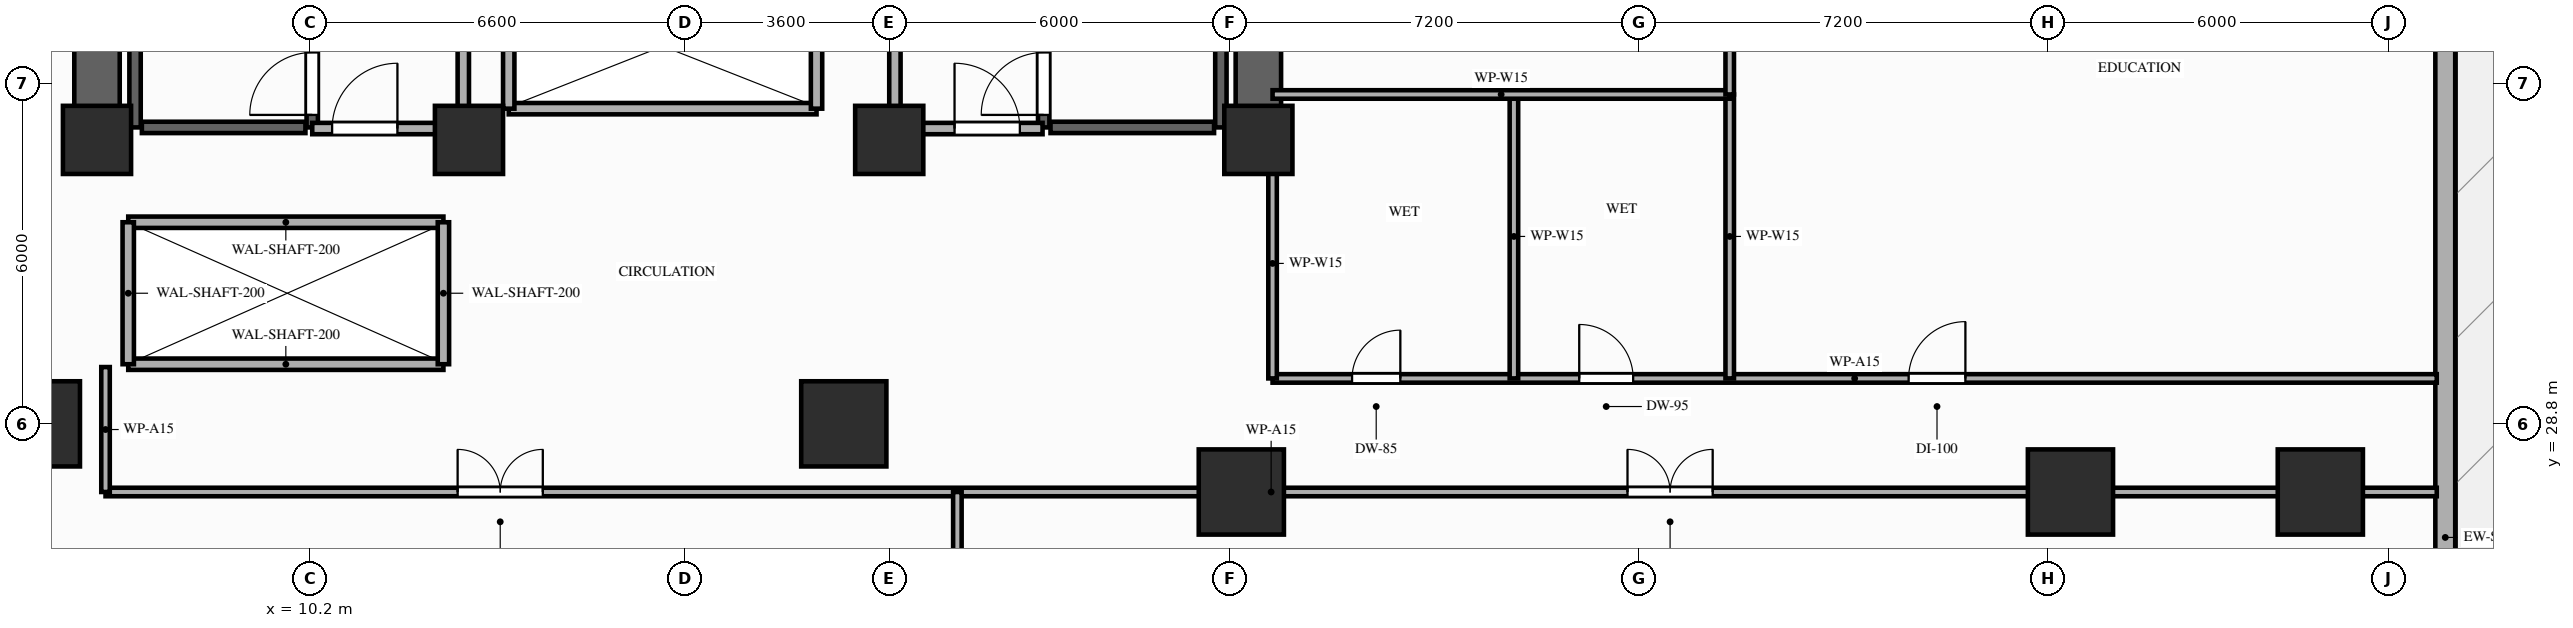
"""IFC4 building model, lengths in metres.
Left out: names, types, materials, properties, quantities, classifications, styles, units other than length and angle.
Written with IfcOpenShell. Run it as: python <this file> out.ifc"""

import sys

from ifc_helpers import new_model, si_unit, direction, frame, frame_2d, origin, origin_2d, place, context, subcontext, project, spatial, rectangle, extrude, element, fill, save


model = new_model("IFC4")
c1 = context("Model", 3, precision=1e-05, world=origin(), true_north=direction((0.0, 1.0)))
c2 = subcontext(c1, "Body", "Model", "MODEL_VIEW")
j1 = project(units=[si_unit("LENGTHUNIT", "METRE"), si_unit("PLANEANGLEUNIT", "RADIAN")], contexts=[c1])
p1 = place(None, origin())
s1 = spatial("IfcSite", under=j1, at=p1, CompositionType="ELEMENT")
p2 = place(p1, origin())
s2 = spatial("IfcBuilding", under=s1, at=p2, CompositionType="ELEMENT")
p3 = place(p2, frame((0.0, 0.0, 21.8)))
s3 = spatial("IfcBuildingStorey", under=s2, at=p3, CompositionType="ELEMENT", Elevation=21.8)
for number, where, z_axis, x_axis in (
    (1, (6.45, 33.8, 0.0), (0.0, 0.0, 1.0), (1.0, 0.0, 0.0)),
    (2, (13.0, 33.8, 0.0), (0.0, 0.0, 1.0), (1.0, 0.0, 0.0)),
    (3, (20.4, 33.8, 0.0), (0.0, 0.0, 1.0), (1.0, 0.0, 0.0)),
    (4, (26.9, 33.8, 0.0), (0.0, 0.0, 1.0), (1.0, 0.0, 0.0)),
):
    element("IfcColumn", number, at=place(p3, frame(where, z_axis=z_axis, x_axis=x_axis)), inside=s3, PredefinedType="COLUMN", context=c2, shape_type="SweptSolid", body=[
        extrude(rectangle(XDim=1.2, YDim=1.2, at=origin_2d()), origin(), (0.0, 0.0, 1.0), 4.6),
    ])
for number, where, z_axis, x_axis in (
    (5, (5.4, 28.8, 0.0), (0.0, 0.0, 1.0), (1.0, 0.0, 0.0)),
    (6, (19.6, 28.8, 0.0), (0.0, 0.0, 1.0), (1.0, 0.0, 0.0)),
    (7, (26.6, 27.6, 0.0), (0.0, 0.0, 1.0), (1.0, 0.0, 0.0)),
    (8, (41.2, 27.6, 0.0), (0.0, 0.0, 1.0), (1.0, 0.0, 0.0)),
):
    element("IfcColumn", number, at=place(p3, frame(where, z_axis=z_axis, x_axis=x_axis)), inside=s3, PredefinedType="COLUMN", context=c2, shape_type="SweptSolid", body=[
        extrude(rectangle(XDim=1.5, YDim=1.5, at=origin_2d()), origin(), (0.0, 0.0, 1.0), 4.05),
    ])
p4 = place(p3, frame((45.6, 27.6, 0.0), z_axis=(0.0, 0.0, 1.0), x_axis=(1.0, 0.0, 0.0)))
e9 = element("IfcColumn", 9, at=p4, inside=s3, PredefinedType="COLUMN", context=c2, shape_type="SweptSolid", body=[
    extrude(rectangle(XDim=1.5, YDim=1.5, at=origin_2d()), origin(), (0.0, 0.0, 1.0), 4.6),
])
p5 = place(p3, frame((47.8, 8.65, 0.0), z_axis=(0.0, 0.0, 1.0), x_axis=(0.0, 1.0, 0.0)))
e10 = element("IfcWall", 10, at=p5, inside=s3, PredefinedType="STANDARD", context=c2, shape_type="SweptSolid", body=[
    extrude(rectangle(XDim=36.3, YDim=0.35, at=frame_2d((18.15, 0.0))), origin(), (0.0, 0.0, 1.0), 4.36),
])
p6 = place(p5, frame((3.4, 0.0, 0.0)))
e11 = element("IfcOpeningElement", 11, at=p6, cuts=e10, PredefinedType="OPENING", context=c2, shape_type="SweptSolid", body=[
    extrude(rectangle(XDim=1.6, YDim=2.15, at=frame_2d((0.8, 1.075))), frame((0.0, 0.185, 0.0), z_axis=(0.0, -1.0, 0.0), x_axis=(1.0, 0.0, 0.0)), (0.0, 0.0, 1.0), 0.37),
])
for number, where, z_axis, x_axis in (
    (12, (6.45, 33.8, 0.0), (0.0, 0.0, 1.0), (0.0, 1.0, 0.0)),
    (13, (26.9, 33.8, 0.0), (0.0, 0.0, 1.0), (0.0, 1.0, 0.0)),
):
    element("IfcWall", number, at=place(p3, frame(where, z_axis=z_axis, x_axis=x_axis)), inside=s3, PredefinedType="SHEAR", context=c2, shape_type="SweptSolid", body=[
        extrude(rectangle(XDim=7.95, YDim=0.8, at=frame_2d((3.975, 0.0))), origin(), (0.0, 0.0, 1.0), 4.36),
    ])
p7 = place(p3, frame((7.12, 34.02, 0.0), z_axis=(0.0, 0.0, 1.0), x_axis=(0.0, 1.0, 0.0)))
e14 = element("IfcWall", 14, at=p7, inside=s3, PredefinedType="SHEAR", context=c2, shape_type="SweptSolid", body=[
    extrude(rectangle(XDim=7.78, YDim=0.2, at=frame_2d((3.89, 0.0))), origin(), (0.0, 0.0, 1.0), 4.36),
])
p8 = place(p3, frame((10.24, 34.02, 0.0), z_axis=(0.0, 0.0, 1.0), x_axis=(0.0, 1.0, 0.0)))
e15 = element("IfcWall", 15, at=p8, inside=s3, PredefinedType="SHEAR", context=c2, shape_type="SweptSolid", body=[
    extrude(rectangle(XDim=7.78, YDim=0.2, at=frame_2d((3.89, 0.0))), origin(), (0.0, 0.0, 1.0), 4.36),
])
p9 = place(p8, frame((0.22, 0.0, 0.0)))
e16 = element("IfcOpeningElement", 16, at=p9, cuts=e15, PredefinedType="OPENING", context=c2, shape_type="SweptSolid", body=[
    extrude(rectangle(XDim=1.1, YDim=2.15, at=frame_2d((0.55, 1.075))), frame((0.0, 0.11, 0.0), z_axis=(0.0, -1.0, 0.0), x_axis=(1.0, 0.0, 0.0)), (0.0, 0.0, 1.0), 0.22),
])
p10 = place(p3, frame((7.24, 34.02, 0.0), z_axis=(0.0, 0.0, 1.0), x_axis=(1.0, 0.0, 0.0)))
e17 = element("IfcWall", 17, at=p10, inside=s3, PredefinedType="SHEAR", context=c2, shape_type="SweptSolid", body=[
    extrude(rectangle(XDim=2.88, YDim=0.2, at=frame_2d((1.44, 0.0))), origin(), (0.0, 0.0, 1.0), 4.36),
])
p11 = place(p3, frame((23.12, 34.02, 0.0), z_axis=(0.0, 0.0, 1.0), x_axis=(0.0, 1.0, 0.0)))
e18 = element("IfcWall", 18, at=p11, inside=s3, PredefinedType="SHEAR", context=c2, shape_type="SweptSolid", body=[
    extrude(rectangle(XDim=7.78, YDim=0.2, at=frame_2d((3.89, 0.0))), origin(), (0.0, 0.0, 1.0), 4.36),
])
p12 = place(p11, frame((0.22, 0.0, 0.0)))
e19 = element("IfcOpeningElement", 19, at=p12, cuts=e18, PredefinedType="OPENING", context=c2, shape_type="SweptSolid", body=[
    extrude(rectangle(XDim=1.1, YDim=2.15, at=frame_2d((0.55, 1.075))), frame((0.0, 0.11, 0.0), z_axis=(0.0, -1.0, 0.0), x_axis=(1.0, 0.0, 0.0)), (0.0, 0.0, 1.0), 0.22),
])
p13 = place(p3, frame((26.24, 34.02, 0.0), z_axis=(0.0, 0.0, 1.0), x_axis=(0.0, 1.0, 0.0)))
e20 = element("IfcWall", 20, at=p13, inside=s3, PredefinedType="SHEAR", context=c2, shape_type="SweptSolid", body=[
    extrude(rectangle(XDim=7.78, YDim=0.2, at=frame_2d((3.89, 0.0))), origin(), (0.0, 0.0, 1.0), 4.36),
])
p14 = place(p3, frame((23.24, 34.02, 0.0), z_axis=(0.0, 0.0, 1.0), x_axis=(1.0, 0.0, 0.0)))
e21 = element("IfcWall", 21, at=p14, inside=s3, PredefinedType="SHEAR", context=c2, shape_type="SweptSolid", body=[
    extrude(rectangle(XDim=2.88, YDim=0.2, at=frame_2d((1.44, 0.0))), origin(), (0.0, 0.0, 1.0), 4.36),
])
for number, where, z_axis, x_axis in (
    (22, (7.0, 29.85, 0.0), (0.0, 0.0, 1.0), (1.0, 0.0, 0.0)),
    (23, (7.0, 32.35, 0.0), (0.0, 0.0, 1.0), (1.0, 0.0, 0.0)),
):
    element("IfcWall", number, at=place(p3, frame(where, z_axis=z_axis, x_axis=x_axis)), inside=s3, PredefinedType="MOVABLE", context=c2, shape_type="SweptSolid", body=[
        extrude(rectangle(XDim=5.55, YDim=0.2, at=frame_2d((2.775, 0.0))), origin(), (0.0, 0.0, 1.0), 4.36),
    ])
for number, where, z_axis, x_axis in (
    (24, (7.0, 29.85, 0.0), (0.0, 0.0, 1.0), (0.0, 1.0, 0.0)),
    (25, (12.55, 29.85, 0.0), (0.0, 0.0, 1.0), (0.0, 1.0, 0.0)),
):
    element("IfcWall", number, at=place(p3, frame(where, z_axis=z_axis, x_axis=x_axis)), inside=s3, PredefinedType="MOVABLE", context=c2, shape_type="SweptSolid", body=[
        extrude(rectangle(XDim=2.5, YDim=0.2, at=frame_2d((1.25, 0.0))), origin(), (0.0, 0.0, 1.0), 4.36),
    ])
p15 = place(p3, frame((12.9, 34.0, 0.0), z_axis=(0.0, 0.0, 1.0), x_axis=(0.0, 1.0, 0.0)))
e26 = element("IfcWall", 26, at=p15, inside=s3, PredefinedType="PARTITIONING", context=c2, shape_type="SweptSolid", body=[
    extrude(rectangle(XDim=5.45, YDim=0.2, at=frame_2d((2.725, 0.0))), origin(), (0.0, 0.0, 1.0), 3.74),
])
p16 = place(p3, frame((10.24, 34.0, 0.0), z_axis=(0.0, 0.0, 1.0), x_axis=(1.0, 0.0, 0.0)))
e27 = element("IfcWall", 27, at=p16, inside=s3, PredefinedType="PARTITIONING", context=c2, shape_type="SweptSolid", body=[
    extrude(rectangle(XDim=2.66, YDim=0.2, at=frame_2d((1.33, 0.0))), origin(), (0.0, 0.0, 1.0), 3.74),
])
p17 = place(p16, frame((0.35, 0.0, 0.0)))
e28 = element("IfcOpeningElement", 28, at=p17, cuts=e27, PredefinedType="OPENING", context=c2, shape_type="SweptSolid", body=[
    extrude(rectangle(XDim=1.15, YDim=2.15, at=frame_2d((0.575, 1.075))), frame((0.0, 0.11, 0.0), z_axis=(0.0, -1.0, 0.0), x_axis=(1.0, 0.0, 0.0)), (0.0, 0.0, 1.0), 0.22),
])
p18 = place(p3, frame((20.5, 34.0, 0.0), z_axis=(0.0, 0.0, 1.0), x_axis=(0.0, 1.0, 0.0)))
e29 = element("IfcWall", 29, at=p18, inside=s3, PredefinedType="PARTITIONING", context=c2, shape_type="SweptSolid", body=[
    extrude(rectangle(XDim=5.45, YDim=0.2, at=frame_2d((2.725, 0.0))), origin(), (0.0, 0.0, 1.0), 3.74),
])
p19 = place(p3, frame((20.5, 34.0, 0.0), z_axis=(0.0, 0.0, 1.0), x_axis=(1.0, 0.0, 0.0)))
e30 = element("IfcWall", 30, at=p19, inside=s3, PredefinedType="PARTITIONING", context=c2, shape_type="SweptSolid", body=[
    extrude(rectangle(XDim=2.6, YDim=0.2, at=frame_2d((1.3, 0.0))), origin(), (0.0, 0.0, 1.0), 3.74),
])
p20 = place(p19, frame((1.05, 0.0, 0.0)))
e31 = element("IfcOpeningElement", 31, at=p20, cuts=e30, PredefinedType="OPENING", context=c2, shape_type="SweptSolid", body=[
    extrude(rectangle(XDim=1.15, YDim=2.15, at=frame_2d((0.575, 1.075))), frame((0.0, 0.11, 0.0), z_axis=(0.0, -1.0, 0.0), x_axis=(1.0, 0.0, 0.0)), (0.0, 0.0, 1.0), 0.22),
])
p21 = place(p3, frame((13.7, 34.35, 0.0), z_axis=(0.0, 0.0, 1.0), x_axis=(1.0, 0.0, 0.0)))
e32 = element("IfcWall", 32, at=p21, inside=s3, PredefinedType="MOVABLE", context=c2, shape_type="SweptSolid", body=[
    extrude(rectangle(XDim=5.42, YDim=0.2, at=frame_2d((2.71, 0.0))), origin(), (0.0, 0.0, 1.0), 4.36),
])
for number, where, z_axis, x_axis in (
    (33, (13.7, 34.35, 0.0), (0.0, 0.0, 1.0), (0.0, 1.0, 0.0)),
    (34, (19.12, 34.35, 0.0), (0.0, 0.0, 1.0), (0.0, 1.0, 0.0)),
):
    element("IfcWall", number, at=place(p3, frame(where, z_axis=z_axis, x_axis=x_axis)), inside=s3, PredefinedType="MOVABLE", context=c2, shape_type="SweptSolid", body=[
        extrude(rectangle(XDim=2.2, YDim=0.2, at=frame_2d((1.1, 0.0))), origin(), (0.0, 0.0, 1.0), 4.36),
    ])
p22 = place(p3, frame((6.6, 27.6, 0.0), z_axis=(0.0, 0.0, 1.0), x_axis=(1.0, 0.0, 0.0)))
e35 = element("IfcWall", 35, at=p22, inside=s3, PredefinedType="PARTITIONING", context=c2, shape_type="SweptSolid", body=[
    extrude(rectangle(XDim=41.05, YDim=0.15, at=frame_2d((20.525, 0.0))), origin(), (0.0, 0.0, 1.0), 2.34),
])
p23 = place(p22, frame((6.2, 0.0, 0.0)))
e36 = element("IfcOpeningElement", 36, at=p23, cuts=e35, PredefinedType="OPENING", context=c2, shape_type="SweptSolid", body=[
    extrude(rectangle(XDim=1.5, YDim=2.18, at=frame_2d((0.75, 1.09))), frame((0.0, 0.085, 0.0), z_axis=(0.0, -1.0, 0.0), x_axis=(1.0, 0.0, 0.0)), (0.0, 0.0, 1.0), 0.17),
])
p24 = place(p22, frame((26.8, 0.0, 0.0)))
e37 = element("IfcOpeningElement", 37, at=p24, cuts=e35, PredefinedType="OPENING", context=c2, shape_type="SweptSolid", body=[
    extrude(rectangle(XDim=1.5, YDim=2.18, at=frame_2d((0.75, 1.09))), frame((0.0, 0.085, 0.0), z_axis=(0.0, -1.0, 0.0), x_axis=(1.0, 0.0, 0.0)), (0.0, 0.0, 1.0), 0.17),
])
p25 = place(p3, frame((6.6, 27.6, 0.0), z_axis=(0.0, 0.0, 1.0), x_axis=(0.0, 1.0, 0.0)))
e38 = element("IfcWall", 38, at=p25, inside=s3, PredefinedType="PARTITIONING", context=c2, shape_type="SweptSolid", body=[
    extrude(rectangle(XDim=2.2, YDim=0.15, at=frame_2d((1.1, 0.0))), origin(), (0.0, 0.0, 1.0), 3.74),
])
p26 = place(p3, frame((27.15, 29.6, 0.0), z_axis=(0.0, 0.0, 1.0), x_axis=(1.0, 0.0, 0.0)))
e39 = element("IfcWall", 39, at=p26, inside=s3, PredefinedType="PARTITIONING", context=c2, shape_type="SweptSolid", body=[
    extrude(rectangle(XDim=20.5, YDim=0.15, at=frame_2d((10.25, 0.0))), origin(), (0.0, 0.0, 1.0), 3.74),
])
p27 = place(p26, frame((1.4, 0.0, 0.0)))
e40 = element("IfcOpeningElement", 40, at=p27, cuts=e39, PredefinedType="OPENING", context=c2, shape_type="SweptSolid", body=[
    extrude(rectangle(XDim=0.85, YDim=2.1, at=frame_2d((0.425, 1.05))), frame((0.0, 0.085, 0.0), z_axis=(0.0, -1.0, 0.0), x_axis=(1.0, 0.0, 0.0)), (0.0, 0.0, 1.0), 0.17),
])
p28 = place(p26, frame((5.4, 0.0, 0.0)))
e41 = element("IfcOpeningElement", 41, at=p28, cuts=e39, PredefinedType="OPENING", context=c2, shape_type="SweptSolid", body=[
    extrude(rectangle(XDim=0.95, YDim=2.1, at=frame_2d((0.475, 1.05))), frame((0.0, 0.085, 0.0), z_axis=(0.0, -1.0, 0.0), x_axis=(1.0, 0.0, 0.0)), (0.0, 0.0, 1.0), 0.17),
])
p29 = place(p26, frame((11.2, 0.0, 0.0)))
e42 = element("IfcOpeningElement", 42, at=p29, cuts=e39, PredefinedType="OPENING", context=c2, shape_type="SweptSolid", body=[
    extrude(rectangle(XDim=1.0, YDim=2.15, at=frame_2d((0.5, 1.075))), frame((0.0, 0.085, 0.0), z_axis=(0.0, -1.0, 0.0), x_axis=(1.0, 0.0, 0.0)), (0.0, 0.0, 1.0), 0.17),
])
p30 = place(p3, frame((21.6, 8.55, 0.0), z_axis=(0.0, 0.0, 1.0), x_axis=(0.0, 1.0, 0.0)))
e43 = element("IfcWall", 43, at=p30, inside=s3, PredefinedType="PARTITIONING", context=c2, shape_type="SweptSolid", body=[
    extrude(rectangle(XDim=19.05, YDim=0.15, at=frame_2d((9.525, 0.0))), origin(), (0.0, 0.0, 1.0), 3.62),
])
p31 = place(p3, frame((27.15, 29.6, 0.0), z_axis=(0.0, 0.0, 1.0), x_axis=(0.0, 1.0, 0.0)))
e44 = element("IfcWall", 44, at=p31, inside=s3, PredefinedType="PARTITIONING", context=c2, shape_type="SweptSolid", body=[
    extrude(rectangle(XDim=4.05, YDim=0.15, at=frame_2d((2.025, 0.0))), origin(), (0.0, 0.0, 1.0), 3.74),
])
p32 = place(p3, frame((31.4, 29.6, 0.0), z_axis=(0.0, 0.0, 1.0), x_axis=(0.0, 1.0, 0.0)))
e45 = element("IfcWall", 45, at=p32, inside=s3, PredefinedType="PARTITIONING", context=c2, shape_type="SweptSolid", body=[
    extrude(rectangle(XDim=5.0, YDim=0.15, at=frame_2d((2.5, 0.0))), origin(), (0.0, 0.0, 1.0), 3.74),
])
p33 = place(p3, frame((35.2, 29.6, 0.0), z_axis=(0.0, 0.0, 1.0), x_axis=(0.0, 1.0, 0.0)))
e46 = element("IfcWall", 46, at=p33, inside=s3, PredefinedType="PARTITIONING", context=c2, shape_type="SweptSolid", body=[
    extrude(rectangle(XDim=5.0, YDim=0.15, at=frame_2d((2.5, 0.0))), origin(), (0.0, 0.0, 1.0), 3.95),
])
p34 = place(p3, frame((27.15, 34.6, 0.0), z_axis=(0.0, 0.0, 1.0), x_axis=(1.0, 0.0, 0.0)))
e47 = element("IfcWall", 47, at=p34, inside=s3, PredefinedType="PARTITIONING", context=c2, shape_type="SweptSolid", body=[
    extrude(rectangle(XDim=8.05, YDim=0.15, at=frame_2d((4.025, 0.0))), origin(), (0.0, 0.0, 1.0), 3.74),
])
p35 = place(p3, frame((35.2, 34.6, 0.0), z_axis=(0.0, 0.0, 1.0), x_axis=(0.0, 1.0, 0.0)))
e48 = element("IfcWall", 48, at=p35, inside=s3, PredefinedType="PARTITIONING", context=c2, shape_type="SweptSolid", body=[
    extrude(rectangle(XDim=10.45, YDim=0.15, at=frame_2d((5.225, 0.0))), origin(), (0.0, 0.0, 1.0), 2.34),
])
p36 = place(p35, frame((3.6, 0.0, 0.0)))
e49 = element("IfcOpeningElement", 49, at=p36, cuts=e48, PredefinedType="OPENING", context=c2, shape_type="SweptSolid", body=[
    extrude(rectangle(XDim=0.95, YDim=2.15, at=frame_2d((0.475, 1.075))), frame((0.0, 0.085, 0.0), z_axis=(0.0, -1.0, 0.0), x_axis=(1.0, 0.0, 0.0)), (0.0, 0.0, 1.0), 0.17),
])
p37 = place(p9, origin())
e50 = element("IfcDoor", 50, at=p37, inside=s3, OperationType="SINGLE_SWING_LEFT", PredefinedType="DOOR", context=c2, shape_type="SweptSolid", body=[
    extrude(rectangle(XDim=1.1, YDim=2.15, at=frame_2d((0.55, 1.075))), frame((0.0, 0.025, 0.0), z_axis=(0.0, -1.0, 0.0), x_axis=(1.0, 0.0, 0.0)), (0.0, 0.0, 1.0), 0.05),
])
fill(e16, e50)
p38 = place(p12, origin())
e51 = element("IfcDoor", 51, at=p38, inside=s3, OperationType="SINGLE_SWING_LEFT", PredefinedType="DOOR", context=c2, shape_type="SweptSolid", body=[
    extrude(rectangle(XDim=1.1, YDim=2.15, at=frame_2d((0.55, 1.075))), frame((0.0, 0.025, 0.0), z_axis=(0.0, -1.0, 0.0), x_axis=(1.0, 0.0, 0.0)), (0.0, 0.0, 1.0), 0.05),
])
fill(e19, e51)
p39 = place(p17, origin())
e52 = element("IfcDoor", 52, at=p39, inside=s3, OperationType="SINGLE_SWING_RIGHT", PredefinedType="DOOR", context=c2, shape_type="SweptSolid", body=[
    extrude(rectangle(XDim=1.15, YDim=2.15, at=frame_2d((0.575, 1.075))), frame((0.0, 0.025, 0.0), z_axis=(0.0, -1.0, 0.0), x_axis=(1.0, 0.0, 0.0)), (0.0, 0.0, 1.0), 0.05),
])
fill(e28, e52)
p40 = place(p20, origin())
e53 = element("IfcDoor", 53, at=p40, inside=s3, OperationType="SINGLE_SWING_LEFT", PredefinedType="DOOR", context=c2, shape_type="SweptSolid", body=[
    extrude(rectangle(XDim=1.15, YDim=2.15, at=frame_2d((0.575, 1.075))), frame((0.0, 0.025, 0.0), z_axis=(0.0, -1.0, 0.0), x_axis=(1.0, 0.0, 0.0)), (0.0, 0.0, 1.0), 0.05),
])
fill(e31, e53)
p41 = place(p23, origin())
e54 = element("IfcDoor", 54, at=p41, inside=s3, OperationType="DOUBLE_DOOR_SINGLE_SWING", PredefinedType="DOOR", context=c2, shape_type="SweptSolid", body=[
    extrude(rectangle(XDim=1.5, YDim=2.18, at=frame_2d((0.75, 1.09))), frame((0.0, 0.025, 0.0), z_axis=(0.0, -1.0, 0.0), x_axis=(1.0, 0.0, 0.0)), (0.0, 0.0, 1.0), 0.05),
])
fill(e36, e54)
p42 = place(p24, origin())
e55 = element("IfcDoor", 55, at=p42, inside=s3, OperationType="DOUBLE_DOOR_SINGLE_SWING", PredefinedType="DOOR", context=c2, shape_type="SweptSolid", body=[
    extrude(rectangle(XDim=1.5, YDim=2.18, at=frame_2d((0.75, 1.09))), frame((0.0, 0.025, 0.0), z_axis=(0.0, -1.0, 0.0), x_axis=(1.0, 0.0, 0.0)), (0.0, 0.0, 1.0), 0.05),
])
fill(e37, e55)
p43 = place(p27, origin())
e56 = element("IfcDoor", 56, at=p43, inside=s3, OperationType="SINGLE_SWING_RIGHT", PredefinedType="DOOR", context=c2, shape_type="SweptSolid", body=[
    extrude(rectangle(XDim=0.85, YDim=2.1, at=frame_2d((0.425, 1.05))), frame((0.0, 0.025, 0.0), z_axis=(0.0, -1.0, 0.0), x_axis=(1.0, 0.0, 0.0)), (0.0, 0.0, 1.0), 0.05),
])
fill(e40, e56)
p44 = place(p28, origin())
e57 = element("IfcDoor", 57, at=p44, inside=s3, OperationType="SINGLE_SWING_LEFT", PredefinedType="DOOR", context=c2, shape_type="SweptSolid", body=[
    extrude(rectangle(XDim=0.95, YDim=2.1, at=frame_2d((0.475, 1.05))), frame((0.0, 0.025, 0.0), z_axis=(0.0, -1.0, 0.0), x_axis=(1.0, 0.0, 0.0)), (0.0, 0.0, 1.0), 0.05),
])
fill(e41, e57)
p45 = place(p29, origin())
e58 = element("IfcDoor", 58, at=p45, inside=s3, OperationType="SINGLE_SWING_RIGHT", PredefinedType="DOOR", context=c2, shape_type="SweptSolid", body=[
    extrude(rectangle(XDim=1.0, YDim=2.15, at=frame_2d((0.5, 1.075))), frame((0.0, 0.025, 0.0), z_axis=(0.0, -1.0, 0.0), x_axis=(1.0, 0.0, 0.0)), (0.0, 0.0, 1.0), 0.05),
])
fill(e42, e58)
save(model, sys.argv[1])
